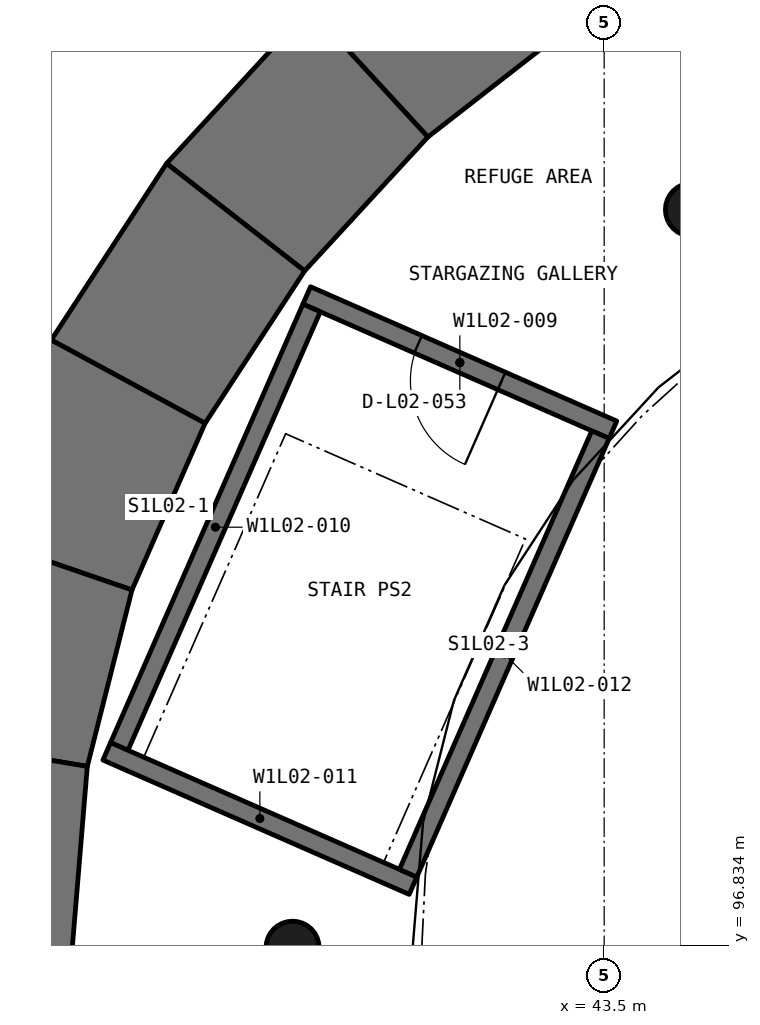
"""IFC4 building model, lengths in metres.
Left out: names, types, materials, properties, quantities, classifications, styles, units other than length and angle.
Written with IfcOpenShell. Run it as: python <this file> out.ifc"""

import sys

from ifc_helpers import new_model, si_unit, direction, frame, frame_2d, origin, origin_2d, place, context, subcontext, project, spatial, polyline, rectangle, circle, outline, extrude, element, fill, save


model = new_model("IFC4")
c1 = context("Model", 3, precision=1e-05, world=origin(), true_north=direction((0.0, 1.0)))
c2 = subcontext(c1, "Body", "Model", "MODEL_VIEW")
j1 = project(units=[si_unit("LENGTHUNIT", "METRE"), si_unit("PLANEANGLEUNIT", "RADIAN")], contexts=[c1])
p1 = place(None, origin())
s1 = spatial("IfcSite", under=j1, at=p1, CompositionType="ELEMENT")
p2 = place(p1, origin())
s2 = spatial("IfcBuilding", under=s1, at=p2, CompositionType="ELEMENT")
p3 = place(p2, frame((0.0, 0.0, 11.25)))
s3 = spatial("IfcBuildingStorey", under=s2, at=p3, CompositionType="ELEMENT", Elevation=11.25)
for number, where, z_axis, x_axis in (
    (1, (44.656, 106.511, -0.3), (0.0, 0.0, 1.0), (1.0, 0.0, 0.0)),
    (2, (39.4, 96.8, -0.3), (0.0, 0.0, 1.0), (1.0, 0.0, 0.0)),
):
    element("IfcColumn", number, at=place(p3, frame(where, z_axis=z_axis, x_axis=x_axis)), inside=s3, PredefinedType="COLUMN", context=c2, shape_type="SweptSolid", body=[
        extrude(circle(Radius=0.35, at=origin_2d()), origin(), (0.0, 0.0, 1.0), 4.5),
    ])
p4 = place(p3, frame((42.516, 109.959, -0.3), z_axis=(0.0, 0.0, 1.0), x_axis=(-0.789143690206, -0.614208625963, 0.0)))
e3 = element("IfcWall", 3, at=p4, inside=s3, PredefinedType="SHEAR", context=c2, shape_type="SweptSolid", body=[
    extrude(outline(polyline([(-0.0, -1.147), (2.775, -1.147), (2.584, 1.147), (0.19, 1.147), (-0.0, -1.147)])), origin(), (0.0, 0.0, 1.0), 2.25),
])
p5 = place(p3, frame((40.466, 108.383, -0.3), z_axis=(0.0, 0.0, 1.0), x_axis=(-0.677336688258, -0.735673168424, 0.0)))
e4 = element("IfcWall", 4, at=p5, inside=s3, PredefinedType="SHEAR", context=c2, shape_type="SweptSolid", body=[
    extrude(outline(polyline([(0.0, -1.147), (2.775, -1.147), (2.584, 1.147), (0.19, 1.147), (0.0, -1.147)])), origin(), (0.0, 0.0, 1.0), 2.25),
])
p6 = place(p3, frame((38.703, 106.491, -0.3), z_axis=(0.0, 0.0, 1.0), x_axis=(-0.546960095535, -0.83715867904, 0.0)))
e5 = element("IfcWall", 5, at=p6, inside=s3, PredefinedType="SHEAR", context=c2, shape_type="SweptSolid", body=[
    extrude(outline(polyline([(0.0, -1.147), (2.775, -1.147), (2.585, 1.147), (0.19, 1.147), (0.0, -1.147)])), origin(), (0.0, 0.0, 1.0), 2.25),
])
p7 = place(p3, frame((37.275, 104.335, -0.3), z_axis=(0.0, 0.0, 1.0), x_axis=(-0.401667968165, -0.915785369696, 0.0)))
e6 = element("IfcWall", 6, at=p7, inside=s3, PredefinedType="SHEAR", context=c2, shape_type="SweptSolid", body=[
    extrude(outline(polyline([(0.0, -1.147), (2.775, -1.147), (2.585, 1.147), (0.19, 1.147), (0.0, -1.147)])), origin(), (0.0, 0.0, 1.0), 2.25),
])
p8 = place(p3, frame((36.222, 101.973, -0.3), z_axis=(0.0, 0.0, 1.0), x_axis=(-0.24549513697, -0.96939782222, 0.0)))
e7 = element("IfcWall", 7, at=p8, inside=s3, PredefinedType="SHEAR", context=c2, shape_type="SweptSolid", body=[
    extrude(outline(polyline([(0.0, -1.147), (2.775, -1.147), (2.585, 1.147), (0.19, 1.147), (0.0, -1.147)])), origin(), (0.0, 0.0, 1.0), 2.25),
])
p9 = place(p3, frame((35.572, 99.47, -0.3), z_axis=(0.0, 0.0, 1.0), x_axis=(-0.082535726981, -0.996588106377, 0.0)))
e8 = element("IfcWall", 8, at=p9, inside=s3, PredefinedType="SHEAR", context=c2, shape_type="SweptSolid", body=[
    extrude(outline(polyline([(0.0, -1.147), (2.775, -1.147), (2.584, 1.147), (0.19, 1.147), (0.0, -1.147)])), origin(), (0.0, 0.0, 1.0), 2.25),
])
p10 = place(p3, frame((42.66, 109.693, 1.95), z_axis=(0.0, 0.0, 1.0), x_axis=(-0.789140888872, -0.614212225139, 0.0)))
e9 = element("IfcWall", 9, at=p10, inside=s3, PredefinedType="SHEAR", context=c2, shape_type="SweptSolid", body=[
    extrude(outline(polyline([(0.0, -0.848), (2.675, -0.848), (2.535, 0.848), (0.14, 0.848), (0.0, -0.848)])), origin(), (0.0, 0.0, 1.0), 2.25),
])
p11 = place(p3, frame((40.652, 108.145, 1.95), z_axis=(0.0, 0.0, 1.0), x_axis=(-0.677256164306, -0.735747298949, 0.0)))
e10 = element("IfcWall", 10, at=p11, inside=s3, PredefinedType="SHEAR", context=c2, shape_type="SweptSolid", body=[
    extrude(outline(polyline([(0.0, -0.848), (2.676, -0.848), (2.535, 0.848), (0.14, 0.848), (0.0, -0.848)])), origin(), (0.0, 0.0, 1.0), 2.25),
])
p12 = place(p3, frame((38.926, 106.286, 1.95), z_axis=(0.0, 0.0, 1.0), x_axis=(-0.546969049206, -0.837152829065, 0.0)))
e11 = element("IfcWall", 11, at=p12, inside=s3, PredefinedType="SHEAR", context=c2, shape_type="SweptSolid", body=[
    extrude(outline(polyline([(0.0, -0.848), (2.676, -0.848), (2.535, 0.848), (0.14, 0.848), (0.0, -0.848)])), origin(), (0.0, 0.0, 1.0), 2.25),
])
p13 = place(p3, frame((37.529, 104.17, 1.95), z_axis=(0.0, 0.0, 1.0), x_axis=(-0.401680291361, -0.915779964583, 0.0)))
e12 = element("IfcWall", 12, at=p13, inside=s3, PredefinedType="SHEAR", context=c2, shape_type="SweptSolid", body=[
    extrude(outline(polyline([(0.0, -0.848), (2.676, -0.848), (2.535, 0.848), (0.141, 0.848), (0.0, -0.848)])), origin(), (0.0, 0.0, 1.0), 2.25),
])
p14 = place(p3, frame((36.5, 101.852, 1.95), z_axis=(0.0, 0.0, 1.0), x_axis=(-0.245454430511, -0.969408130017, 0.0)))
e13 = element("IfcWall", 13, at=p14, inside=s3, PredefinedType="SHEAR", context=c2, shape_type="SweptSolid", body=[
    extrude(outline(polyline([(0.0, -0.848), (2.676, -0.848), (2.535, 0.848), (0.141, 0.848), (0.0, -0.848)])), origin(), (0.0, 0.0, 1.0), 2.25),
])
p15 = place(p3, frame((35.866, 99.396, 1.95), z_axis=(0.0, 0.0, 1.0), x_axis=(-0.082577286265, -0.996584663635, 0.0)))
e14 = element("IfcWall", 14, at=p15, inside=s3, PredefinedType="SHEAR", context=c2, shape_type="SweptSolid", body=[
    extrude(outline(polyline([(0.0, -0.848), (2.676, -0.848), (2.535, 0.848), (0.141, 0.848), (0.0, -0.848)])), origin(), (0.0, 0.0, 1.0), 2.25),
])
p16 = place(p3, frame((43.616, 103.615, -0.3), z_axis=(0.0, 0.0, 1.0), x_axis=(-0.915768514631, 0.401706394785, 0.0)))
e15 = element("IfcWall", 15, at=p16, inside=s3, PredefinedType="SHEAR", context=c2, shape_type="SweptSolid", body=[
    extrude(rectangle(XDim=4.4, YDim=0.25, at=frame_2d((2.2, 0.0))), origin(), (0.0, 0.0, 1.0), 4.5),
])
p17 = place(p16, frame((1.6, 0.0, 0.3)))
e16 = element("IfcOpeningElement", 16, at=p17, cuts=e15, PredefinedType="OPENING", context=c2, shape_type="SweptSolid", body=[
    extrude(rectangle(XDim=1.2, YDim=2.2, at=frame_2d((0.6, 1.1))), frame((0.0, 0.135, 0.0), z_axis=(0.0, -1.0, 0.0), x_axis=(1.0, 0.0, 0.0)), (0.0, 0.0, 1.0), 0.27),
])
p18 = place(p3, frame((39.651, 105.218, -0.3), z_axis=(0.0, 0.0, 1.0), x_axis=(-0.401711100828, -0.915766450287, 0.0)))
e17 = element("IfcWall", 17, at=p18, inside=s3, PredefinedType="SHEAR", context=c2, shape_type="SweptSolid", body=[
    extrude(rectangle(XDim=6.3, YDim=0.25, at=frame_2d((3.15, 0.0))), origin(), (0.0, 0.0, 1.0), 4.5),
])
p19 = place(p3, frame((40.985, 97.617, -0.3), z_axis=(0.0, 0.0, 1.0), x_axis=(-0.915768514631, 0.401706394785, 0.0)))
e18 = element("IfcWall", 18, at=p19, inside=s3, PredefinedType="SHEAR", context=c2, shape_type="SweptSolid", body=[
    extrude(rectangle(XDim=4.4, YDim=0.25, at=frame_2d((2.2, 0.0))), origin(), (0.0, 0.0, 1.0), 4.5),
])
p20 = place(p3, frame((43.451, 103.551, -0.3), z_axis=(0.0, 0.0, 1.0), x_axis=(-0.401678600913, -0.915780706047, 0.0)))
e19 = element("IfcWall", 19, at=p20, inside=s3, PredefinedType="SHEAR", context=c2, shape_type="SweptSolid", body=[
    extrude(rectangle(XDim=6.3, YDim=0.25, at=frame_2d((3.15, 0.0))), origin(), (0.0, 0.0, 1.0), 4.5),
])
p21 = place(p17, origin())
e20 = element("IfcDoor", 20, at=p21, inside=s3, OperationType="SINGLE_SWING_LEFT", PredefinedType="DOOR", context=c2, shape_type="SweptSolid", body=[
    extrude(rectangle(XDim=1.2, YDim=2.2, at=frame_2d((0.6, 1.1))), frame((0.0, 0.025, 0.0), z_axis=(0.0, -1.0, 0.0), x_axis=(1.0, 0.0, 0.0)), (0.0, 0.0, 1.0), 0.05),
])
fill(e16, e20)
save(model, sys.argv[1])
